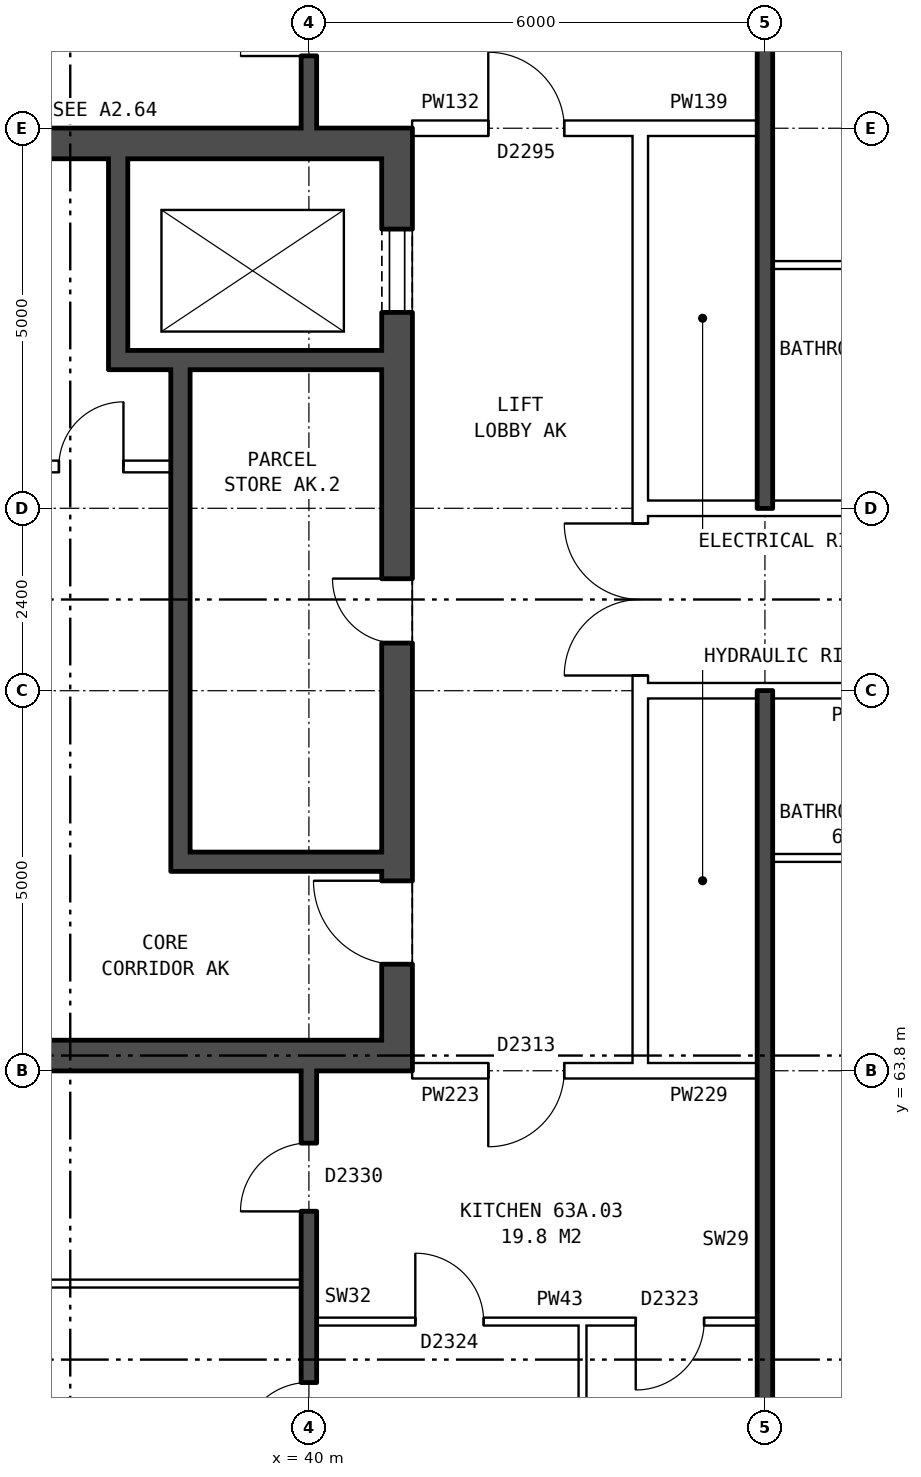
"""IFC4 building model, lengths in metres.
Left out: names, types, materials, properties, quantities, classifications, styles, units other than length and angle.
Written with IfcOpenShell. Run it as: python <this file> out.ifc"""

import sys

from ifc_helpers import new_model, si_unit, direction, frame, frame_2d, origin, place, context, subcontext, project, spatial, rectangle, extrude, element, fill, save


model = new_model("IFC4")
c1 = context("Model", 3, precision=1e-05, world=origin(), true_north=direction((0.0, 1.0)))
c2 = subcontext(c1, "Body", "Model", "MODEL_VIEW")
j1 = project(units=[si_unit("LENGTHUNIT", "METRE"), si_unit("PLANEANGLEUNIT", "RADIAN")], contexts=[c1])
p1 = place(None, origin())
s1 = spatial("IfcSite", under=j1, at=p1, CompositionType="ELEMENT")
p2 = place(p1, origin())
s2 = spatial("IfcBuilding", under=s1, at=p2, CompositionType="ELEMENT")
p3 = place(p2, frame((0.0, 0.0, 224.5)))
s3 = spatial("IfcBuildingStorey", under=s2, at=p3, CompositionType="ELEMENT", Elevation=224.5)
p4 = place(p3, frame((41.16, 76.2, 0.0), z_axis=(0.0, 0.0, 1.0), x_axis=(0.0, -1.0, 0.0)))
e1 = element("IfcWall", 1, at=p4, inside=s3, PredefinedType="SHEAR", context=c2, shape_type="SweptSolid", body=[
    extrude(rectangle(XDim=12.4, YDim=0.4, at=frame_2d((6.2, 0.0))), origin(), (0.0, 0.0, 1.0), 2.85),
])
p5 = place(p4, frame((1.325, 0.0, 0.0)))
e2 = element("IfcOpeningElement", 2, at=p5, cuts=e1, PredefinedType="OPENING", context=c2, shape_type="SweptSolid", body=[
    extrude(rectangle(XDim=1.1, YDim=2.1, at=frame_2d((0.55, 1.05))), frame((0.0, 0.21, 0.0), z_axis=(0.0, -1.0, 0.0), x_axis=(1.0, 0.0, 0.0)), (0.0, 0.0, 1.0), 0.42),
])
p6 = place(p4, frame((5.925, 0.0, 0.0)))
e3 = element("IfcOpeningElement", 3, at=p6, cuts=e1, PredefinedType="OPENING", context=c2, shape_type="SweptSolid", body=[
    extrude(rectangle(XDim=0.85, YDim=2.1, at=frame_2d((0.425, 1.05))), frame((0.0, 0.21, 0.0), z_axis=(0.0, -1.0, 0.0), x_axis=(1.0, 0.0, 0.0)), (0.0, 0.0, 1.0), 0.42),
])
p7 = place(p4, frame((9.9, 0.0, 0.0)))
e4 = element("IfcOpeningElement", 4, at=p7, cuts=e1, PredefinedType="OPENING", context=c2, shape_type="SweptSolid", body=[
    extrude(rectangle(XDim=1.1, YDim=2.1, at=frame_2d((0.55, 1.05))), frame((0.0, 0.21, 0.0), z_axis=(0.0, -1.0, 0.0), x_axis=(1.0, 0.0, 0.0)), (0.0, 0.0, 1.0), 0.42),
])
for number, where, z_axis, x_axis in (
    (5, (40.96, 76.0, 0.0), (0.0, 0.0, 1.0), (-1.0, 0.0, 0.0)),
    (6, (40.96, 64.0, 0.0), (0.0, 0.0, 1.0), (-1.0, 0.0, 0.0)),
):
    element("IfcWall", number, at=place(p3, frame(where, z_axis=z_axis, x_axis=x_axis)), inside=s3, PredefinedType="SHEAR", context=c2, shape_type="SweptSolid", body=[
        extrude(rectangle(XDim=8.2, YDim=0.4, at=frame_2d((4.1, 0.0))), origin(), (0.0, 0.0, 1.0), 2.85),
    ])
p8 = place(p3, frame((40.96, 73.15, 0.0), z_axis=(0.0, 0.0, 1.0), x_axis=(-1.0, 0.0, 0.0)))
e7 = element("IfcWall", 7, at=p8, inside=s3, PredefinedType="SHEAR", context=c2, shape_type="SweptSolid", body=[
    extrude(rectangle(XDim=3.595, YDim=0.25, at=frame_2d((1.797, 0.0))), origin(), (0.0, 0.0, 1.0), 2.85),
])
p9 = place(p3, frame((38.185, 71.75, 0.0), z_axis=(0.0, 0.0, 1.0), x_axis=(-1.0, 0.0, 0.0)))
e8 = element("IfcWall", 8, at=p9, inside=s3, PredefinedType="PARTITIONING", context=c2, shape_type="SweptSolid", body=[
    extrude(rectangle(XDim=2.1, YDim=0.15, at=frame_2d((1.05, 0.0))), origin(), (0.0, 0.0, 1.0), 2.85),
])
p10 = place(p9, frame((0.625, 0.0, 0.0)))
e9 = element("IfcOpeningElement", 9, at=p10, cuts=e8, PredefinedType="OPENING", context=c2, shape_type="SweptSolid", body=[
    extrude(rectangle(XDim=0.85, YDim=2.1, at=frame_2d((0.425, 1.05))), frame((0.0, 0.085, 0.0), z_axis=(0.0, -1.0, 0.0), x_axis=(1.0, 0.0, 0.0)), (0.0, 0.0, 1.0), 0.17),
])
p11 = place(p3, frame((40.96, 66.55, 0.0), z_axis=(0.0, 0.0, 1.0), x_axis=(-1.0, 0.0, 0.0)))
e10 = element("IfcWall", 10, at=p11, inside=s3, PredefinedType="SHEAR", context=c2, shape_type="SweptSolid", body=[
    extrude(rectangle(XDim=2.525, YDim=0.25, at=frame_2d((1.262, 0.0))), origin(), (0.0, 0.0, 1.0), 2.85),
])
p12 = place(p3, frame((38.31, 73.025, 0.0), z_axis=(0.0, 0.0, 1.0), x_axis=(0.0, -1.0, 0.0)))
e11 = element("IfcWall", 11, at=p12, inside=s3, PredefinedType="SHEAR", context=c2, shape_type="SweptSolid", body=[
    extrude(rectangle(XDim=6.6, YDim=0.25, at=frame_2d((3.3, 0.0))), origin(), (0.0, 0.0, 1.0), 2.85),
])
p13 = place(p3, frame((37.49, 75.8, 0.0), z_axis=(0.0, 0.0, 1.0), x_axis=(0.0, -1.0, 0.0)))
e12 = element("IfcWall", 12, at=p13, inside=s3, PredefinedType="SHEAR", context=c2, shape_type="SweptSolid", body=[
    extrude(rectangle(XDim=2.525, YDim=0.25, at=frame_2d((1.263, 0.0))), origin(), (0.0, 0.0, 1.0), 2.85),
])
p14 = place(p3, frame((44.36, 63.9, 0.0), z_axis=(0.0, 0.0, 1.0), x_axis=(0.0, 1.0, 0.0)))
e13 = element("IfcWall", 13, at=p14, inside=s3, PredefinedType="PARTITIONING", context=c2, shape_type="SweptSolid", body=[
    extrude(rectangle(XDim=12.2, YDim=0.2, at=frame_2d((6.1, 0.0))), origin(), (0.0, 0.0, 1.0), 2.85),
])
p15 = place(p14, frame((5.1, 0.0, 0.0)))
e14 = element("IfcOpeningElement", 14, at=p15, cuts=e13, PredefinedType="OPENING", context=c2, shape_type="SweptSolid", body=[
    extrude(rectangle(XDim=2.0, YDim=2.1, at=frame_2d((1.0, 1.05))), frame((0.0, 0.11, 0.0), z_axis=(0.0, -1.0, 0.0), x_axis=(1.0, 0.0, 0.0)), (0.0, 0.0, 1.0), 0.22),
])
p16 = place(p3, frame((40.1, 60.5, 0.0), z_axis=(0.0, 0.0, 1.0), x_axis=(1.0, 0.0, 0.0)))
e15 = element("IfcWall", 15, at=p16, inside=s3, PredefinedType="PARTITIONING", context=c2, shape_type="SweptSolid", body=[
    extrude(rectangle(XDim=5.8, YDim=0.1, at=frame_2d((2.9, 0.0))), origin(), (0.0, 0.0, 1.0), 2.85),
])
p17 = place(p16, frame((1.3, 0.0, 0.0)))
e16 = element("IfcOpeningElement", 16, at=p17, cuts=e15, PredefinedType="OPENING", context=c2, shape_type="SweptSolid", body=[
    extrude(rectangle(XDim=0.9, YDim=2.1, at=frame_2d((0.45, 1.05))), frame((0.0, 0.06, 0.0), z_axis=(0.0, -1.0, 0.0), x_axis=(1.0, 0.0, 0.0)), (0.0, 0.0, 1.0), 0.12),
])
p18 = place(p16, frame((4.2, 0.0, 0.0)))
e17 = element("IfcOpeningElement", 17, at=p18, cuts=e15, PredefinedType="OPENING", context=c2, shape_type="SweptSolid", body=[
    extrude(rectangle(XDim=0.9, YDim=2.1, at=frame_2d((0.45, 1.05))), frame((0.0, 0.06, 0.0), z_axis=(0.0, -1.0, 0.0), x_axis=(1.0, 0.0, 0.0)), (0.0, 0.0, 1.0), 0.12),
])
p19 = place(p3, frame((32.36, 61.0, 0.0), z_axis=(0.0, 0.0, 1.0), x_axis=(1.0, 0.0, 0.0)))
e18 = element("IfcWall", 18, at=p19, inside=s3, PredefinedType="PARTITIONING", context=c2, shape_type="SweptSolid", body=[
    extrude(rectangle(XDim=7.54, YDim=0.1, at=frame_2d((3.77, 0.0))), origin(), (0.0, 0.0, 1.0), 2.85),
])
p20 = place(p3, frame((41.36, 63.8, 0.0), z_axis=(0.0, 0.0, 1.0), x_axis=(1.0, 0.0, 0.0)))
e19 = element("IfcWall", 19, at=p20, inside=s3, PredefinedType="PARTITIONING", context=c2, shape_type="SweptSolid", body=[
    extrude(rectangle(XDim=3.0, YDim=0.2, at=frame_2d((1.5, 0.0))), origin(), (0.0, 0.0, 1.0), 2.85),
])
p21 = place(p20, frame((1.0, 0.0, 0.0)))
e20 = element("IfcOpeningElement", 20, at=p21, cuts=e19, PredefinedType="OPENING", context=c2, shape_type="SweptSolid", body=[
    extrude(rectangle(XDim=1.0, YDim=2.1, at=frame_2d((0.5, 1.05))), frame((0.0, 0.11, 0.0), z_axis=(0.0, -1.0, 0.0), x_axis=(1.0, 0.0, 0.0)), (0.0, 0.0, 1.0), 0.22),
])
p22 = place(p3, frame((44.36, 63.8, 0.0), z_axis=(0.0, 0.0, 1.0), x_axis=(1.0, 0.0, 0.0)))
e21 = element("IfcWall", 21, at=p22, inside=s3, PredefinedType="PARTITIONING", context=c2, shape_type="SweptSolid", body=[
    extrude(rectangle(XDim=1.54, YDim=0.2, at=frame_2d((0.77, 0.0))), origin(), (0.0, 0.0, 1.0), 2.85),
])
p23 = place(p3, frame((46.1, 66.6, 0.0), z_axis=(0.0, 0.0, 1.0), x_axis=(1.0, 0.0, 0.0)))
e22 = element("IfcWall", 22, at=p23, inside=s3, PredefinedType="PARTITIONING", context=c2, shape_type="SweptSolid", body=[
    extrude(rectangle(XDim=2.9, YDim=0.1, at=frame_2d((1.45, 0.0))), origin(), (0.0, 0.0, 1.0), 2.85),
])
p24 = place(p3, frame((44.36, 68.8, 0.0), z_axis=(0.0, 0.0, 1.0), x_axis=(1.0, 0.0, 0.0)))
e23 = element("IfcWall", 23, at=p24, inside=s3, PredefinedType="PARTITIONING", context=c2, shape_type="SweptSolid", body=[
    extrude(rectangle(XDim=19.28, YDim=0.2, at=frame_2d((9.64, 0.0))), origin(), (0.0, 0.0, 1.0), 2.85),
])
p25 = place(p24, frame((14.64, 0.0, 0.0)))
e24 = element("IfcOpeningElement", 24, at=p25, cuts=e23, PredefinedType="OPENING", context=c2, shape_type="SweptSolid", body=[
    extrude(rectangle(XDim=1.0, YDim=2.1, at=frame_2d((0.5, 1.05))), frame((0.0, 0.11, 0.0), z_axis=(0.0, -1.0, 0.0), x_axis=(1.0, 0.0, 0.0)), (0.0, 0.0, 1.0), 0.22),
])
p26 = place(p24, frame((8.64, 0.0, 0.0)))
e25 = element("IfcOpeningElement", 25, at=p26, cuts=e23, PredefinedType="OPENING", context=c2, shape_type="SweptSolid", body=[
    extrude(rectangle(XDim=1.0, YDim=2.1, at=frame_2d((0.5, 1.05))), frame((0.0, 0.11, 0.0), z_axis=(0.0, -1.0, 0.0), x_axis=(1.0, 0.0, 0.0)), (0.0, 0.0, 1.0), 0.22),
])
p27 = place(p24, frame((5.64, 0.0, 0.0)))
e26 = element("IfcOpeningElement", 26, at=p27, cuts=e23, PredefinedType="OPENING", context=c2, shape_type="SweptSolid", body=[
    extrude(rectangle(XDim=1.0, YDim=2.1, at=frame_2d((0.5, 1.05))), frame((0.0, 0.11, 0.0), z_axis=(0.0, -1.0, 0.0), x_axis=(1.0, 0.0, 0.0)), (0.0, 0.0, 1.0), 0.22),
])
p28 = place(p3, frame((44.36, 71.2, 0.0), z_axis=(0.0, 0.0, 1.0), x_axis=(1.0, 0.0, 0.0)))
e27 = element("IfcWall", 27, at=p28, inside=s3, PredefinedType="PARTITIONING", context=c2, shape_type="SweptSolid", body=[
    extrude(rectangle(XDim=19.28, YDim=0.2, at=frame_2d((9.64, 0.0))), origin(), (0.0, 0.0, 1.0), 2.85),
])
p29 = place(p28, frame((14.64, 0.0, 0.0)))
e28 = element("IfcOpeningElement", 28, at=p29, cuts=e27, PredefinedType="OPENING", context=c2, shape_type="SweptSolid", body=[
    extrude(rectangle(XDim=1.0, YDim=2.1, at=frame_2d((0.5, 1.05))), frame((0.0, 0.11, 0.0), z_axis=(0.0, -1.0, 0.0), x_axis=(1.0, 0.0, 0.0)), (0.0, 0.0, 1.0), 0.22),
])
p30 = place(p28, frame((5.64, 0.0, 0.0)))
e29 = element("IfcOpeningElement", 29, at=p30, cuts=e27, PredefinedType="OPENING", context=c2, shape_type="SweptSolid", body=[
    extrude(rectangle(XDim=1.0, YDim=2.1, at=frame_2d((0.5, 1.05))), frame((0.0, 0.11, 0.0), z_axis=(0.0, -1.0, 0.0), x_axis=(1.0, 0.0, 0.0)), (0.0, 0.0, 1.0), 0.22),
])
p31 = place(p3, frame((46.1, 74.4, 0.0), z_axis=(0.0, 0.0, 1.0), x_axis=(1.0, 0.0, 0.0)))
e30 = element("IfcWall", 30, at=p31, inside=s3, PredefinedType="PARTITIONING", context=c2, shape_type="SweptSolid", body=[
    extrude(rectangle(XDim=2.9, YDim=0.1, at=frame_2d((1.45, 0.0))), origin(), (0.0, 0.0, 1.0), 2.85),
])
p32 = place(p3, frame((41.36, 76.2, 0.0), z_axis=(0.0, 0.0, 1.0), x_axis=(1.0, 0.0, 0.0)))
e31 = element("IfcWall", 31, at=p32, inside=s3, PredefinedType="PARTITIONING", context=c2, shape_type="SweptSolid", body=[
    extrude(rectangle(XDim=3.0, YDim=0.2, at=frame_2d((1.5, 0.0))), origin(), (0.0, 0.0, 1.0), 2.85),
])
p33 = place(p32, frame((1.0, 0.0, 0.0)))
e32 = element("IfcOpeningElement", 32, at=p33, cuts=e31, PredefinedType="OPENING", context=c2, shape_type="SweptSolid", body=[
    extrude(rectangle(XDim=1.0, YDim=2.1, at=frame_2d((0.5, 1.05))), frame((0.0, 0.11, 0.0), z_axis=(0.0, -1.0, 0.0), x_axis=(1.0, 0.0, 0.0)), (0.0, 0.0, 1.0), 0.22),
])
p34 = place(p3, frame((44.36, 76.2, 0.0), z_axis=(0.0, 0.0, 1.0), x_axis=(1.0, 0.0, 0.0)))
e33 = element("IfcWall", 33, at=p34, inside=s3, PredefinedType="PARTITIONING", context=c2, shape_type="SweptSolid", body=[
    extrude(rectangle(XDim=1.54, YDim=0.2, at=frame_2d((0.77, 0.0))), origin(), (0.0, 0.0, 1.0), 2.85),
])
p35 = place(p3, frame((40.0, 54.36, 0.0), z_axis=(0.0, 0.0, 1.0), x_axis=(0.0, 1.0, 0.0)))
e34 = element("IfcWall", 34, at=p35, inside=s3, PredefinedType="SOLIDWALL", context=c2, shape_type="SweptSolid", body=[
    extrude(rectangle(XDim=9.44, YDim=0.2, at=frame_2d((4.72, 0.0))), origin(), (0.0, 0.0, 1.0), 2.85),
])
p36 = place(p35, frame((1.37, 0.0, 0.0)))
e35 = element("IfcOpeningElement", 35, at=p36, cuts=e34, PredefinedType="OPENING", context=c2, shape_type="SweptSolid", body=[
    extrude(rectangle(XDim=0.9, YDim=2.1, at=frame_2d((0.45, 1.05))), frame((0.0, 0.11, 0.0), z_axis=(0.0, -1.0, 0.0), x_axis=(1.0, 0.0, 0.0)), (0.0, 0.0, 1.0), 0.22),
])
p37 = place(p35, frame((4.44, 0.0, 0.0)))
e36 = element("IfcOpeningElement", 36, at=p37, cuts=e34, PredefinedType="OPENING", context=c2, shape_type="SweptSolid", body=[
    extrude(rectangle(XDim=0.9, YDim=2.1, at=frame_2d((0.45, 1.05))), frame((0.0, 0.11, 0.0), z_axis=(0.0, -1.0, 0.0), x_axis=(1.0, 0.0, 0.0)), (0.0, 0.0, 1.0), 0.22),
])
p38 = place(p35, frame((7.59, 0.0, 0.0)))
e37 = element("IfcOpeningElement", 37, at=p38, cuts=e34, PredefinedType="OPENING", context=c2, shape_type="SweptSolid", body=[
    extrude(rectangle(XDim=0.9, YDim=2.1, at=frame_2d((0.45, 1.05))), frame((0.0, 0.11, 0.0), z_axis=(0.0, -1.0, 0.0), x_axis=(1.0, 0.0, 0.0)), (0.0, 0.0, 1.0), 0.22),
])
p39 = place(p3, frame((40.0, 76.2, 0.0), z_axis=(0.0, 0.0, 1.0), x_axis=(0.0, 1.0, 0.0)))
e38 = element("IfcWall", 38, at=p39, inside=s3, PredefinedType="SOLIDWALL", context=c2, shape_type="SweptSolid", body=[
    extrude(rectangle(XDim=9.44, YDim=0.2, at=frame_2d((4.72, 0.0))), origin(), (0.0, 0.0, 1.0), 2.85),
])
p40 = place(p39, frame((7.17, 0.0, 0.0)))
e39 = element("IfcOpeningElement", 39, at=p40, cuts=e38, PredefinedType="OPENING", context=c2, shape_type="SweptSolid", body=[
    extrude(rectangle(XDim=0.9, YDim=2.1, at=frame_2d((0.45, 1.05))), frame((0.0, 0.11, 0.0), z_axis=(0.0, -1.0, 0.0), x_axis=(1.0, 0.0, 0.0)), (0.0, 0.0, 1.0), 0.22),
])
p41 = place(p39, frame((4.25, 0.0, 0.0)))
e40 = element("IfcOpeningElement", 40, at=p41, cuts=e38, PredefinedType="OPENING", context=c2, shape_type="SweptSolid", body=[
    extrude(rectangle(XDim=0.9, YDim=2.1, at=frame_2d((0.45, 1.05))), frame((0.0, 0.11, 0.0), z_axis=(0.0, -1.0, 0.0), x_axis=(1.0, 0.0, 0.0)), (0.0, 0.0, 1.0), 0.22),
])
p42 = place(p39, frame((0.95, 0.0, 0.0)))
e41 = element("IfcOpeningElement", 41, at=p42, cuts=e38, PredefinedType="OPENING", context=c2, shape_type="SweptSolid", body=[
    extrude(rectangle(XDim=0.9, YDim=2.1, at=frame_2d((0.45, 1.05))), frame((0.0, 0.11, 0.0), z_axis=(0.0, -1.0, 0.0), x_axis=(1.0, 0.0, 0.0)), (0.0, 0.0, 1.0), 0.22),
])
p43 = place(p3, frame((43.6, 57.75, 0.0), z_axis=(0.0, 0.0, 1.0), x_axis=(0.0, 1.0, 0.0)))
e42 = element("IfcWall", 42, at=p43, inside=s3, PredefinedType="PARTITIONING", context=c2, shape_type="SweptSolid", body=[
    extrude(rectangle(XDim=2.7, YDim=0.1, at=frame_2d((1.35, 0.0))), origin(), (0.0, 0.0, 1.0), 2.85),
])
for number, where, z_axis, x_axis in (
    (43, (46.0, 54.36, 0.0), (0.0, 0.0, 1.0), (0.0, 1.0, 0.0)),
    (44, (46.0, 71.2, 0.0), (0.0, 0.0, 1.0), (0.0, 1.0, 0.0)),
):
    element("IfcWall", number, at=place(p3, frame(where, z_axis=z_axis, x_axis=x_axis)), inside=s3, PredefinedType="SOLIDWALL", context=c2, shape_type="SweptSolid", body=[
        extrude(rectangle(XDim=14.44, YDim=0.2, at=frame_2d((7.22, 0.0))), origin(), (0.0, 0.0, 1.0), 2.85),
    ])
p44 = place(p5, origin())
e45 = element("IfcDoor", 45, at=p44, inside=s3, OperationType="DOUBLE_DOOR_SLIDING", PredefinedType="DOOR", context=c2, shape_type="SweptSolid", body=[
    extrude(rectangle(XDim=1.1, YDim=2.1, at=frame_2d((0.55, 1.05))), frame((0.0, -0.135, 0.0), z_axis=(0.0, -1.0, 0.0), x_axis=(1.0, 0.0, 0.0)), (0.0, 0.0, 1.0), 0.05),
])
fill(e2, e45)
p45 = place(p6, frame((0.85, 0.0, 0.0), z_axis=(0.0, 0.0, 1.0), x_axis=(-1.0, 0.0, 0.0)))
e46 = element("IfcDoor", 46, at=p45, inside=s3, OperationType="SINGLE_SWING_RIGHT", PredefinedType="DOOR", context=c2, shape_type="SweptSolid", body=[
    extrude(rectangle(XDim=0.85, YDim=2.1, at=frame_2d((0.425, 1.05))), frame((0.0, 0.185, 0.0), z_axis=(0.0, -1.0, 0.0), x_axis=(1.0, 0.0, 0.0)), (0.0, 0.0, 1.0), 0.05),
])
fill(e3, e46)
p46 = place(p7, frame((1.1, 0.0, 0.0), z_axis=(0.0, 0.0, 1.0), x_axis=(-1.0, 0.0, 0.0)))
e47 = element("IfcDoor", 47, at=p46, inside=s3, OperationType="SINGLE_SWING_RIGHT", PredefinedType="DOOR", context=c2, shape_type="SweptSolid", body=[
    extrude(rectangle(XDim=1.1, YDim=2.1, at=frame_2d((0.55, 1.05))), frame((0.0, 0.185, 0.0), z_axis=(0.0, -1.0, 0.0), x_axis=(1.0, 0.0, 0.0)), (0.0, 0.0, 1.0), 0.05),
])
fill(e4, e47)
p47 = place(p10, frame((0.85, 0.0, 0.0), z_axis=(0.0, 0.0, 1.0), x_axis=(-1.0, 0.0, 0.0)))
e48 = element("IfcDoor", 48, at=p47, inside=s3, OperationType="SINGLE_SWING_RIGHT", PredefinedType="DOOR", context=c2, shape_type="SweptSolid", body=[
    extrude(rectangle(XDim=0.85, YDim=2.1, at=frame_2d((0.425, 1.05))), frame((0.0, 0.025, 0.0), z_axis=(0.0, -1.0, 0.0), x_axis=(1.0, 0.0, 0.0)), (0.0, 0.0, 1.0), 0.05),
])
fill(e9, e48)
p48 = place(p15, origin())
e49 = element("IfcDoor", 49, at=p48, inside=s3, OperationType="DOUBLE_DOOR_SINGLE_SWING", PredefinedType="DOOR", context=c2, shape_type="SweptSolid", body=[
    extrude(rectangle(XDim=2.0, YDim=2.1, at=frame_2d((1.0, 1.05))), frame((0.0, 0.025, 0.0), z_axis=(0.0, -1.0, 0.0), x_axis=(1.0, 0.0, 0.0)), (0.0, 0.0, 1.0), 0.05),
])
fill(e14, e49)
p49 = place(p37, origin())
e50 = element("IfcDoor", 50, at=p49, inside=s3, OperationType="SINGLE_SWING_LEFT", PredefinedType="DOOR", context=c2, shape_type="SweptSolid", body=[
    extrude(rectangle(XDim=0.9, YDim=2.1, at=frame_2d((0.45, 1.05))), frame((0.0, 0.025, 0.0), z_axis=(0.0, -1.0, 0.0), x_axis=(1.0, 0.0, 0.0)), (0.0, 0.0, 1.0), 0.05),
])
fill(e36, e50)
p50 = place(p38, origin())
e51 = element("IfcDoor", 51, at=p50, inside=s3, OperationType="SINGLE_SWING_LEFT", PredefinedType="DOOR", context=c2, shape_type="SweptSolid", body=[
    extrude(rectangle(XDim=0.9, YDim=2.1, at=frame_2d((0.45, 1.05))), frame((0.0, 0.025, 0.0), z_axis=(0.0, -1.0, 0.0), x_axis=(1.0, 0.0, 0.0)), (0.0, 0.0, 1.0), 0.05),
])
fill(e37, e51)
p51 = place(p21, frame((1.0, 0.0, 0.0), z_axis=(0.0, 0.0, 1.0), x_axis=(-1.0, 0.0, 0.0)))
e52 = element("IfcDoor", 52, at=p51, inside=s3, OperationType="SINGLE_SWING_RIGHT", PredefinedType="DOOR", context=c2, shape_type="SweptSolid", body=[
    extrude(rectangle(XDim=1.0, YDim=2.1, at=frame_2d((0.5, 1.05))), frame((0.0, 0.025, 0.0), z_axis=(0.0, -1.0, 0.0), x_axis=(1.0, 0.0, 0.0)), (0.0, 0.0, 1.0), 0.05),
])
fill(e20, e52)
p52 = place(p17, origin())
e53 = element("IfcDoor", 53, at=p52, inside=s3, OperationType="SINGLE_SWING_LEFT", PredefinedType="DOOR", context=c2, shape_type="SweptSolid", body=[
    extrude(rectangle(XDim=0.9, YDim=2.1, at=frame_2d((0.45, 1.05))), frame((0.0, 0.025, 0.0), z_axis=(0.0, -1.0, 0.0), x_axis=(1.0, 0.0, 0.0)), (0.0, 0.0, 1.0), 0.05),
])
fill(e16, e53)
p53 = place(p18, frame((0.9, 0.0, 0.0), z_axis=(0.0, 0.0, 1.0), x_axis=(-1.0, 0.0, 0.0)))
e54 = element("IfcDoor", 54, at=p53, inside=s3, OperationType="SINGLE_SWING_RIGHT", PredefinedType="DOOR", context=c2, shape_type="SweptSolid", body=[
    extrude(rectangle(XDim=0.9, YDim=2.1, at=frame_2d((0.45, 1.05))), frame((0.0, 0.025, 0.0), z_axis=(0.0, -1.0, 0.0), x_axis=(1.0, 0.0, 0.0)), (0.0, 0.0, 1.0), 0.05),
])
fill(e17, e54)
p54 = place(p42, origin())
e55 = element("IfcDoor", 55, at=p54, inside=s3, OperationType="SINGLE_SWING_LEFT", PredefinedType="DOOR", context=c2, shape_type="SweptSolid", body=[
    extrude(rectangle(XDim=0.9, YDim=2.1, at=frame_2d((0.45, 1.05))), frame((0.0, 0.025, 0.0), z_axis=(0.0, -1.0, 0.0), x_axis=(1.0, 0.0, 0.0)), (0.0, 0.0, 1.0), 0.05),
])
fill(e41, e55)
p55 = place(p33, origin())
e56 = element("IfcDoor", 56, at=p55, inside=s3, OperationType="SINGLE_SWING_LEFT", PredefinedType="DOOR", context=c2, shape_type="SweptSolid", body=[
    extrude(rectangle(XDim=1.0, YDim=2.1, at=frame_2d((0.5, 1.05))), frame((0.0, 0.025, 0.0), z_axis=(0.0, -1.0, 0.0), x_axis=(1.0, 0.0, 0.0)), (0.0, 0.0, 1.0), 0.05),
])
fill(e32, e56)
save(model, sys.argv[1])
